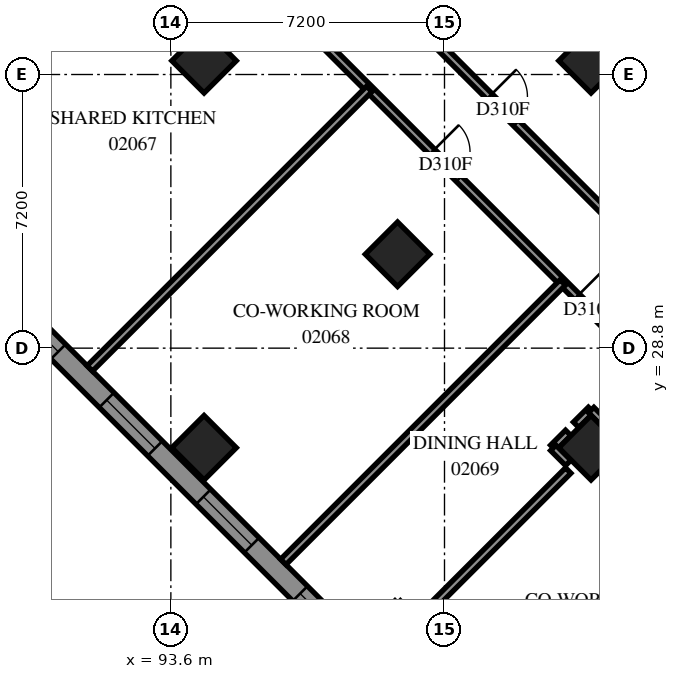
"""IFC4 building model, lengths in metres.
Left out: names, types, materials, properties, quantities, classifications, styles, units other than length and angle.
Written with IfcOpenShell. Run it as: python <this file> out.ifc"""

import sys

from ifc_helpers import new_model, si_unit, direction, frame, frame_2d, origin, origin_2d, place, context, subcontext, project, spatial, polyline, rectangle, outline, extrude, element, fill, save


model = new_model("IFC4")
c1 = context("Model", 3, precision=1e-05, world=origin(), true_north=direction((0.0, 1.0)))
c2 = subcontext(c1, "Body", "Model", "MODEL_VIEW")
j1 = project(units=[si_unit("LENGTHUNIT", "METRE"), si_unit("PLANEANGLEUNIT", "RADIAN")], contexts=[c1])
p1 = place(None, origin())
s1 = spatial("IfcSite", under=j1, at=p1, CompositionType="ELEMENT")
p2 = place(p1, origin())
s2 = spatial("IfcBuilding", under=s1, at=p2, CompositionType="ELEMENT")
p3 = place(p2, frame((0.0, 0.0, 10.2)))
s3 = spatial("IfcBuildingStorey", under=s2, at=p3, CompositionType="ELEMENT", Elevation=10.2)
for number, where, z_axis, x_axis in (
    (1, (94.474, 36.362, 0.0), (0.0, 0.0, 1.0), (0.707, -0.707, 0.0)),
    (2, (104.656, 36.362, 0.0), (0.0, 0.0, 1.0), (0.707, -0.707, 0.0)),
    (3, (99.565, 31.271, 0.0), (0.0, 0.0, 1.0), (0.707, -0.707, 0.0)),
    (4, (94.474, 26.18, 0.0), (0.0, 0.0, 1.0), (0.707, -0.707, 0.0)),
    (5, (104.656, 26.18, 0.0), (0.0, 0.0, 1.0), (0.707, -0.707, 0.0)),
):
    element("IfcColumn", number, at=place(p3, frame(where, z_axis=z_axis, x_axis=x_axis)), inside=s3, PredefinedType="COLUMN", context=c2, shape_type="SweptSolid", body=[
        extrude(rectangle(XDim=1.2, YDim=1.2, at=origin_2d()), origin(), (0.0, 0.0, 1.0), 3.8),
    ])
p4 = place(p3, frame((104.656, 14.689, 0.0), z_axis=(0.0, 0.0, 1.0), x_axis=(0.7071094621, 0.7071041002, 0.0)))
e6 = element("IfcWall", 6, at=p4, inside=s3, PredefinedType="SOLIDWALL", context=c2, shape_type="SweptSolid", body=[
    extrude(outline(polyline([(-0.275, -0.275), (18.925, -0.275), (18.375, 0.275), (0.275, 0.275), (-0.275, -0.275)])), origin(), (0.0, 0.0, 1.0), 3.8),
])
p5 = place(p4, frame((1.825, 0.0, 0.7)))
e7 = element("IfcOpeningElement", 7, at=p5, cuts=e6, PredefinedType="OPENING", context=c2, shape_type="SweptSolid", body=[
    extrude(rectangle(XDim=1.8, YDim=2.6, at=frame_2d((0.9, 1.3))), frame((0.0, 0.285, 0.0), z_axis=(0.0, -1.0, 0.0), x_axis=(1.0, 0.0, 0.0)), (0.0, 0.0, 1.0), 0.57),
])
p6 = place(p4, frame((5.425, 0.0, 0.7)))
e8 = element("IfcOpeningElement", 8, at=p6, cuts=e6, PredefinedType="OPENING", context=c2, shape_type="SweptSolid", body=[
    extrude(rectangle(XDim=1.8, YDim=2.6, at=frame_2d((0.9, 1.3))), frame((0.0, 0.285, 0.0), z_axis=(0.0, -1.0, 0.0), x_axis=(1.0, 0.0, 0.0)), (0.0, 0.0, 1.0), 0.57),
])
p7 = place(p4, frame((8.725, 0.0, 0.7)))
e9 = element("IfcOpeningElement", 9, at=p7, cuts=e6, PredefinedType="OPENING", context=c2, shape_type="SweptSolid", body=[
    extrude(rectangle(XDim=1.8, YDim=2.6, at=frame_2d((0.9, 1.3))), frame((0.0, 0.285, 0.0), z_axis=(0.0, -1.0, 0.0), x_axis=(1.0, 0.0, 0.0)), (0.0, 0.0, 1.0), 0.57),
])
p8 = place(p4, frame((12.875, 0.0, 0.7)))
e10 = element("IfcOpeningElement", 10, at=p8, cuts=e6, PredefinedType="OPENING", context=c2, shape_type="SweptSolid", body=[
    extrude(rectangle(XDim=1.8, YDim=2.6, at=frame_2d((0.9, 1.3))), frame((0.0, 0.285, 0.0), z_axis=(0.0, -1.0, 0.0), x_axis=(1.0, 0.0, 0.0)), (0.0, 0.0, 1.0), 0.57),
])
p9 = place(p4, frame((16.05, 0.0, 0.7)))
e11 = element("IfcOpeningElement", 11, at=p9, cuts=e6, PredefinedType="OPENING", context=c2, shape_type="SweptSolid", body=[
    extrude(rectangle(XDim=1.8, YDim=2.6, at=frame_2d((0.9, 1.3))), frame((0.0, 0.285, 0.0), z_axis=(0.0, -1.0, 0.0), x_axis=(1.0, 0.0, 0.0)), (0.0, 0.0, 1.0), 0.57),
])
p10 = place(p3, frame((117.843, 34.665, 0.0), z_axis=(0.0, 0.0, 1.0), x_axis=(-0.7071067812, 0.7071067812, 0.0)))
e12 = element("IfcWall", 12, at=p10, inside=s3, PredefinedType="SOLIDWALL", context=c2, shape_type="SweptSolid", body=[
    extrude(outline(polyline([(-0.275, -0.275), (54.222, -0.275), (53.994, 0.275), (0.275, 0.275), (-0.275, -0.275)])), origin(), (0.0, 0.0, 1.0), 3.8),
])
p11 = place(p10, frame((0.8, 0.0, 0.7)))
e13 = element("IfcOpeningElement", 13, at=p11, cuts=e12, PredefinedType="OPENING", context=c2, shape_type="SweptSolid", body=[
    extrude(rectangle(XDim=1.8, YDim=2.6, at=frame_2d((0.9, 1.3))), frame((0.0, 0.285, 0.0), z_axis=(0.0, -1.0, 0.0), x_axis=(1.0, 0.0, 0.0)), (0.0, 0.0, 1.0), 0.57),
])
p12 = place(p10, frame((4.225, 0.0, 0.7)))
e14 = element("IfcOpeningElement", 14, at=p12, cuts=e12, PredefinedType="OPENING", context=c2, shape_type="SweptSolid", body=[
    extrude(rectangle(XDim=1.8, YDim=2.6, at=frame_2d((0.9, 1.3))), frame((0.0, 0.285, 0.0), z_axis=(0.0, -1.0, 0.0), x_axis=(1.0, 0.0, 0.0)), (0.0, 0.0, 1.0), 0.57),
])
p13 = place(p10, frame((7.825, 0.0, 0.7)))
e15 = element("IfcOpeningElement", 15, at=p13, cuts=e12, PredefinedType="OPENING", context=c2, shape_type="SweptSolid", body=[
    extrude(rectangle(XDim=1.8, YDim=2.6, at=frame_2d((0.9, 1.3))), frame((0.0, 0.285, 0.0), z_axis=(0.0, -1.0, 0.0), x_axis=(1.0, 0.0, 0.0)), (0.0, 0.0, 1.0), 0.57),
])
p14 = place(p10, frame((11.425, 0.0, 0.7)))
e16 = element("IfcOpeningElement", 16, at=p14, cuts=e12, PredefinedType="OPENING", context=c2, shape_type="SweptSolid", body=[
    extrude(rectangle(XDim=1.8, YDim=2.6, at=frame_2d((0.9, 1.3))), frame((0.0, 0.285, 0.0), z_axis=(0.0, -1.0, 0.0), x_axis=(1.0, 0.0, 0.0)), (0.0, 0.0, 1.0), 0.57),
])
p15 = place(p10, frame((15.025, 0.0, 0.7)))
e17 = element("IfcOpeningElement", 17, at=p15, cuts=e12, PredefinedType="OPENING", context=c2, shape_type="SweptSolid", body=[
    extrude(rectangle(XDim=1.8, YDim=2.6, at=frame_2d((0.9, 1.3))), frame((0.0, 0.285, 0.0), z_axis=(0.0, -1.0, 0.0), x_axis=(1.0, 0.0, 0.0)), (0.0, 0.0, 1.0), 0.57),
])
p16 = place(p10, frame((18.625, 0.0, 0.7)))
e18 = element("IfcOpeningElement", 18, at=p16, cuts=e12, PredefinedType="OPENING", context=c2, shape_type="SweptSolid", body=[
    extrude(rectangle(XDim=1.8, YDim=2.6, at=frame_2d((0.9, 1.3))), frame((0.0, 0.285, 0.0), z_axis=(0.0, -1.0, 0.0), x_axis=(1.0, 0.0, 0.0)), (0.0, 0.0, 1.0), 0.57),
])
p17 = place(p10, frame((22.225, 0.0, 0.7)))
e19 = element("IfcOpeningElement", 19, at=p17, cuts=e12, PredefinedType="OPENING", context=c2, shape_type="SweptSolid", body=[
    extrude(rectangle(XDim=1.8, YDim=2.6, at=frame_2d((0.9, 1.3))), frame((0.0, 0.285, 0.0), z_axis=(0.0, -1.0, 0.0), x_axis=(1.0, 0.0, 0.0)), (0.0, 0.0, 1.0), 0.57),
])
p18 = place(p10, frame((25.825, 0.0, 0.7)))
e20 = element("IfcOpeningElement", 20, at=p18, cuts=e12, PredefinedType="OPENING", context=c2, shape_type="SweptSolid", body=[
    extrude(rectangle(XDim=1.8, YDim=2.6, at=frame_2d((0.9, 1.3))), frame((0.0, 0.285, 0.0), z_axis=(0.0, -1.0, 0.0), x_axis=(1.0, 0.0, 0.0)), (0.0, 0.0, 1.0), 0.57),
])
p19 = place(p10, frame((29.425, 0.0, 0.7)))
e21 = element("IfcOpeningElement", 21, at=p19, cuts=e12, PredefinedType="OPENING", context=c2, shape_type="SweptSolid", body=[
    extrude(rectangle(XDim=1.8, YDim=2.6, at=frame_2d((0.9, 1.3))), frame((0.0, 0.285, 0.0), z_axis=(0.0, -1.0, 0.0), x_axis=(1.0, 0.0, 0.0)), (0.0, 0.0, 1.0), 0.57),
])
p20 = place(p10, frame((33.025, 0.0, 0.7)))
e22 = element("IfcOpeningElement", 22, at=p20, cuts=e12, PredefinedType="OPENING", context=c2, shape_type="SweptSolid", body=[
    extrude(rectangle(XDim=1.8, YDim=2.6, at=frame_2d((0.9, 1.3))), frame((0.0, 0.285, 0.0), z_axis=(0.0, -1.0, 0.0), x_axis=(1.0, 0.0, 0.0)), (0.0, 0.0, 1.0), 0.57),
])
p21 = place(p10, frame((36.625, 0.0, 0.7)))
e23 = element("IfcOpeningElement", 23, at=p21, cuts=e12, PredefinedType="OPENING", context=c2, shape_type="SweptSolid", body=[
    extrude(rectangle(XDim=1.8, YDim=2.6, at=frame_2d((0.9, 1.3))), frame((0.0, 0.285, 0.0), z_axis=(0.0, -1.0, 0.0), x_axis=(1.0, 0.0, 0.0)), (0.0, 0.0, 1.0), 0.57),
])
p22 = place(p10, frame((40.225, 0.0, 0.7)))
e24 = element("IfcOpeningElement", 24, at=p22, cuts=e12, PredefinedType="OPENING", context=c2, shape_type="SweptSolid", body=[
    extrude(rectangle(XDim=1.8, YDim=2.6, at=frame_2d((0.9, 1.3))), frame((0.0, 0.285, 0.0), z_axis=(0.0, -1.0, 0.0), x_axis=(1.0, 0.0, 0.0)), (0.0, 0.0, 1.0), 0.57),
])
p23 = place(p10, frame((43.825, 0.0, 0.7)))
e25 = element("IfcOpeningElement", 25, at=p23, cuts=e12, PredefinedType="OPENING", context=c2, shape_type="SweptSolid", body=[
    extrude(rectangle(XDim=1.8, YDim=2.6, at=frame_2d((0.9, 1.3))), frame((0.0, 0.285, 0.0), z_axis=(0.0, -1.0, 0.0), x_axis=(1.0, 0.0, 0.0)), (0.0, 0.0, 1.0), 0.57),
])
p24 = place(p10, frame((47.425, 0.0, 0.7)))
e26 = element("IfcOpeningElement", 26, at=p24, cuts=e12, PredefinedType="OPENING", context=c2, shape_type="SweptSolid", body=[
    extrude(rectangle(XDim=1.8, YDim=2.6, at=frame_2d((0.9, 1.3))), frame((0.0, 0.285, 0.0), z_axis=(0.0, -1.0, 0.0), x_axis=(1.0, 0.0, 0.0)), (0.0, 0.0, 1.0), 0.57),
])
p25 = place(p10, frame((50.96, 0.0, 0.7)))
e27 = element("IfcOpeningElement", 27, at=p25, cuts=e12, PredefinedType="OPENING", context=c2, shape_type="SweptSolid", body=[
    extrude(rectangle(XDim=1.8, YDim=2.6, at=frame_2d((0.9, 1.3))), frame((0.0, 0.285, 0.0), z_axis=(0.0, -1.0, 0.0), x_axis=(1.0, 0.0, 0.0)), (0.0, 0.0, 1.0), 0.57),
])
p26 = place(p3, frame((77.07, 42.275, 0.0), z_axis=(0.0, 0.0, 1.0), x_axis=(0.7071067812, -0.7071067812, 0.0)))
e28 = element("IfcWall", 28, at=p26, inside=s3, PredefinedType="SOLIDWALL", context=c2, shape_type="SweptSolid", body=[
    extrude(outline(polyline([(0.114, -0.275), (39.288, -0.275), (38.737, 0.275), (-0.114, 0.275), (0.114, -0.275)])), origin(), (0.0, 0.0, 1.0), 3.8),
])
p27 = place(p26, frame((2.837, 0.0, 0.7)))
e29 = element("IfcOpeningElement", 29, at=p27, cuts=e28, PredefinedType="OPENING", context=c2, shape_type="SweptSolid", body=[
    extrude(rectangle(XDim=1.8, YDim=2.6, at=frame_2d((0.9, 1.3))), frame((0.0, 0.285, 0.0), z_axis=(0.0, -1.0, 0.0), x_axis=(1.0, 0.0, 0.0)), (0.0, 0.0, 1.0), 0.57),
])
p28 = place(p26, frame((6.588, 0.0, 0.7)))
e30 = element("IfcOpeningElement", 30, at=p28, cuts=e28, PredefinedType="OPENING", context=c2, shape_type="SweptSolid", body=[
    extrude(rectangle(XDim=1.8, YDim=2.6, at=frame_2d((0.9, 1.3))), frame((0.0, 0.285, 0.0), z_axis=(0.0, -1.0, 0.0), x_axis=(1.0, 0.0, 0.0)), (0.0, 0.0, 1.0), 0.57),
])
p29 = place(p26, frame((10.188, 0.0, 0.7)))
e31 = element("IfcOpeningElement", 31, at=p29, cuts=e28, PredefinedType="OPENING", context=c2, shape_type="SweptSolid", body=[
    extrude(rectangle(XDim=1.8, YDim=2.6, at=frame_2d((0.9, 1.3))), frame((0.0, 0.285, 0.0), z_axis=(0.0, -1.0, 0.0), x_axis=(1.0, 0.0, 0.0)), (0.0, 0.0, 1.0), 0.57),
])
p30 = place(p26, frame((13.787, 0.0, 0.7)))
e32 = element("IfcOpeningElement", 32, at=p30, cuts=e28, PredefinedType="OPENING", context=c2, shape_type="SweptSolid", body=[
    extrude(rectangle(XDim=1.8, YDim=2.6, at=frame_2d((0.9, 1.3))), frame((0.0, 0.285, 0.0), z_axis=(0.0, -1.0, 0.0), x_axis=(1.0, 0.0, 0.0)), (0.0, 0.0, 1.0), 0.57),
])
p31 = place(p26, frame((17.387, 0.0, 0.7)))
e33 = element("IfcOpeningElement", 33, at=p31, cuts=e28, PredefinedType="OPENING", context=c2, shape_type="SweptSolid", body=[
    extrude(rectangle(XDim=1.8, YDim=2.6, at=frame_2d((0.9, 1.3))), frame((0.0, 0.285, 0.0), z_axis=(0.0, -1.0, 0.0), x_axis=(1.0, 0.0, 0.0)), (0.0, 0.0, 1.0), 0.57),
])
p32 = place(p26, frame((20.988, 0.0, 0.7)))
e34 = element("IfcOpeningElement", 34, at=p32, cuts=e28, PredefinedType="OPENING", context=c2, shape_type="SweptSolid", body=[
    extrude(rectangle(XDim=1.8, YDim=2.6, at=frame_2d((0.9, 1.3))), frame((0.0, 0.285, 0.0), z_axis=(0.0, -1.0, 0.0), x_axis=(1.0, 0.0, 0.0)), (0.0, 0.0, 1.0), 0.57),
])
p33 = place(p26, frame((24.587, 0.0, 0.7)))
e35 = element("IfcOpeningElement", 35, at=p33, cuts=e28, PredefinedType="OPENING", context=c2, shape_type="SweptSolid", body=[
    extrude(rectangle(XDim=1.8, YDim=2.6, at=frame_2d((0.9, 1.3))), frame((0.0, 0.285, 0.0), z_axis=(0.0, -1.0, 0.0), x_axis=(1.0, 0.0, 0.0)), (0.0, 0.0, 1.0), 0.57),
])
p34 = place(p26, frame((28.188, 0.0, 0.7)))
e36 = element("IfcOpeningElement", 36, at=p34, cuts=e28, PredefinedType="OPENING", context=c2, shape_type="SweptSolid", body=[
    extrude(rectangle(XDim=1.8, YDim=2.6, at=frame_2d((0.9, 1.3))), frame((0.0, 0.285, 0.0), z_axis=(0.0, -1.0, 0.0), x_axis=(1.0, 0.0, 0.0)), (0.0, 0.0, 1.0), 0.57),
])
p35 = place(p26, frame((31.788, 0.0, 0.7)))
e37 = element("IfcOpeningElement", 37, at=p35, cuts=e28, PredefinedType="OPENING", context=c2, shape_type="SweptSolid", body=[
    extrude(rectangle(XDim=1.8, YDim=2.6, at=frame_2d((0.9, 1.3))), frame((0.0, 0.285, 0.0), z_axis=(0.0, -1.0, 0.0), x_axis=(1.0, 0.0, 0.0)), (0.0, 0.0, 1.0), 0.57),
])
p36 = place(p26, frame((35.388, 0.0, 0.7)))
e38 = element("IfcOpeningElement", 38, at=p36, cuts=e28, PredefinedType="OPENING", context=c2, shape_type="SweptSolid", body=[
    extrude(rectangle(XDim=1.8, YDim=2.6, at=frame_2d((0.9, 1.3))), frame((0.0, 0.285, 0.0), z_axis=(0.0, -1.0, 0.0), x_axis=(1.0, 0.0, 0.0)), (0.0, 0.0, 1.0), 0.57),
])
p37 = place(p3, frame((94.861, 42.544, 0.0), z_axis=(0.0, 0.0, 1.0), x_axis=(0.7071067812, -0.7071067812, 0.0)))
e39 = element("IfcWall", 39, at=p37, inside=s3, PredefinedType="PARTITIONING", context=c2, shape_type="SweptSolid", body=[
    extrude(rectangle(XDim=25.699, YDim=0.2, at=frame_2d((12.85, 0.0))), origin(), (0.0, 0.0, 1.0), 3.8),
])
p38 = place(p37, frame((10.072, 0.0, 0.0)))
e40 = element("IfcOpeningElement", 40, at=p38, cuts=e39, PredefinedType="OPENING", context=c2, shape_type="SweptSolid", body=[
    extrude(rectangle(XDim=1.0, YDim=2.1, at=frame_2d((0.5, 1.05))), frame((0.0, 0.11, 0.0), z_axis=(0.0, -1.0, 0.0), x_axis=(1.0, 0.0, 0.0)), (0.0, 0.0, 1.0), 0.22),
])
p39 = place(p37, frame((2.872, 0.0, 0.0)))
e41 = element("IfcOpeningElement", 41, at=p39, cuts=e39, PredefinedType="OPENING", context=c2, shape_type="SweptSolid", body=[
    extrude(rectangle(XDim=1.0, YDim=2.1, at=frame_2d((0.5, 1.05))), frame((0.0, 0.11, 0.0), z_axis=(0.0, -1.0, 0.0), x_axis=(1.0, 0.0, 0.0)), (0.0, 0.0, 1.0), 0.22),
])
p40 = place(p37, frame((17.272, 0.0, 0.0)))
e42 = element("IfcOpeningElement", 42, at=p40, cuts=e39, PredefinedType="OPENING", context=c2, shape_type="SweptSolid", body=[
    extrude(rectangle(XDim=1.0, YDim=2.1, at=frame_2d((0.5, 1.05))), frame((0.0, 0.11, 0.0), z_axis=(0.0, -1.0, 0.0), x_axis=(1.0, 0.0, 0.0)), (0.0, 0.0, 1.0), 0.22),
])
p41 = place(p37, frame((22.606, 0.0, 0.0)))
e43 = element("IfcOpeningElement", 43, at=p41, cuts=e39, PredefinedType="OPENING", context=c2, shape_type="SweptSolid", body=[
    extrude(rectangle(XDim=1.0, YDim=2.1, at=frame_2d((0.5, 1.05))), frame((0.0, 0.11, 0.0), z_axis=(0.0, -1.0, 0.0), x_axis=(1.0, 0.0, 0.0)), (0.0, 0.0, 1.0), 0.22),
])
p42 = place(p3, frame((93.375, 41.061, 0.0), z_axis=(0.0, 0.0, 1.0), x_axis=(0.7071067812, -0.7071067812, 0.0)))
e44 = element("IfcWall", 44, at=p42, inside=s3, PredefinedType="PARTITIONING", context=c2, shape_type="SweptSolid", body=[
    extrude(rectangle(XDim=25.699, YDim=0.2, at=frame_2d((12.85, 0.0))), origin(), (0.0, 0.0, 1.0), 3.8),
])
p43 = place(p42, frame((2.837, 0.0, 0.0)))
e45 = element("IfcOpeningElement", 45, at=p43, cuts=e44, PredefinedType="OPENING", context=c2, shape_type="SweptSolid", body=[
    extrude(rectangle(XDim=1.0, YDim=2.1, at=frame_2d((0.5, 1.05))), frame((0.0, 0.11, 0.0), z_axis=(0.0, -1.0, 0.0), x_axis=(1.0, 0.0, 0.0)), (0.0, 0.0, 1.0), 0.22),
])
p44 = place(p42, frame((10.037, 0.0, 0.0)))
e46 = element("IfcOpeningElement", 46, at=p44, cuts=e44, PredefinedType="OPENING", context=c2, shape_type="SweptSolid", body=[
    extrude(rectangle(XDim=1.0, YDim=2.1, at=frame_2d((0.5, 1.05))), frame((0.0, 0.11, 0.0), z_axis=(0.0, -1.0, 0.0), x_axis=(1.0, 0.0, 0.0)), (0.0, 0.0, 1.0), 0.22),
])
p45 = place(p42, frame((15.425, 0.0, 0.0)))
e47 = element("IfcOpeningElement", 47, at=p45, cuts=e44, PredefinedType="OPENING", context=c2, shape_type="SweptSolid", body=[
    extrude(rectangle(XDim=1.0, YDim=2.1, at=frame_2d((0.5, 1.05))), frame((0.0, 0.11, 0.0), z_axis=(0.0, -1.0, 0.0), x_axis=(1.0, 0.0, 0.0)), (0.0, 0.0, 1.0), 0.22),
])
p46 = place(p42, frame((22.057, 0.0, 0.0)))
e48 = element("IfcOpeningElement", 48, at=p46, cuts=e44, PredefinedType="OPENING", context=c2, shape_type="SweptSolid", body=[
    extrude(rectangle(XDim=1.0, YDim=2.1, at=frame_2d((0.5, 1.05))), frame((0.0, 0.11, 0.0), z_axis=(0.0, -1.0, 0.0), x_axis=(1.0, 0.0, 0.0)), (0.0, 0.0, 1.0), 0.22),
])
for number, where, z_axis, x_axis in (
    (49, (86.376, 33.357, 0.0), (0.0, 0.0, 1.0), (0.707, 0.707, 0.0)),
    (50, (91.468, 28.266, 0.0), (0.0, 0.0, 1.0), (0.707, 0.707, 0.0)),
    (51, (96.559, 23.175, 0.0), (0.0, 0.0, 1.0), (0.707, 0.707, 0.0)),
):
    element("IfcWall", number, at=place(p3, frame(where, z_axis=z_axis, x_axis=x_axis)), inside=s3, PredefinedType="PARTITIONING", context=c2, shape_type="SweptSolid", body=[
        extrude(rectangle(XDim=10.4, YDim=0.2, at=frame_2d((5.2, 0.0))), origin(), (0.0, 0.0, 1.0), 3.8),
    ])
p47 = place(p3, frame((86.836, 34.524, 0.0), z_axis=(0.0, 0.0, 1.0), x_axis=(0.7071067812, 0.7071067812, 0.0)))
e52 = element("IfcWall", 52, at=p47, inside=s3, PredefinedType="PARTITIONING", context=c2, shape_type="SweptSolid", body=[
    extrude(rectangle(XDim=9.249, YDim=0.2, at=frame_2d((4.625, 0.0))), origin(), (0.0, 0.0, 1.0), 3.8),
])
p48 = place(p3, frame((100.163, 21.689, 0.0), z_axis=(0.0, 0.0, 1.0), x_axis=(0.7071067812, 0.7071067812, 0.0)))
e53 = element("IfcWall", 53, at=p48, inside=s3, PredefinedType="PARTITIONING", context=c2, shape_type="SweptSolid", body=[
    extrude(rectangle(XDim=5.504, YDim=0.2, at=frame_2d((2.752, 0.0))), origin(), (0.0, 0.0, 1.0), 3.8),
])
for number, where, z_axis, x_axis in (
    (54, (103.661, 26.177, 0.0), (0.0, 0.0, 1.0), (0.707, 0.707, 0.0)),
    (55, (103.662, 26.177, 0.0), (0.0, 0.0, 1.0), (0.707, -0.707, 0.0)),
):
    element("IfcWall", number, at=place(p3, frame(where, z_axis=z_axis, x_axis=x_axis)), inside=s3, PredefinedType="PARTITIONING", context=c2, shape_type="SweptSolid", body=[
        extrude(rectangle(XDim=0.557, YDim=0.2, at=frame_2d((0.279, 0.0))), origin(), (0.0, 0.0, 1.0), 3.8),
    ])
p49 = place(p3, frame((104.263, 26.784, 0.0), z_axis=(0.0, 0.0, 1.0), x_axis=(0.7089037401, 0.705305244, 0.0)))
e56 = element("IfcWall", 56, at=p49, inside=s3, PredefinedType="PARTITIONING", context=c2, shape_type="SweptSolid", body=[
    extrude(rectangle(XDim=0.556, YDim=0.2, at=frame_2d((0.278, 0.0))), origin(), (0.0, 0.0, 1.0), 3.8),
])
p50 = place(p3, frame((104.66, 27.172, 0.0), z_axis=(0.0, 0.0, 1.0), x_axis=(0.7071067812, -0.7071067812, 0.0)))
e57 = element("IfcWall", 57, at=p50, inside=s3, PredefinedType="PARTITIONING", context=c2, shape_type="SweptSolid", body=[
    extrude(rectangle(XDim=0.554, YDim=0.2, at=frame_2d((0.277, 0.0))), origin(), (0.0, 0.0, 1.0), 3.8),
])
p51 = place(p31, origin())
e58 = element("IfcWindow", 58, at=p51, inside=s3, PartitioningType="SINGLE_PANEL", PredefinedType="WINDOW", context=c2, shape_type="SweptSolid", body=[
    extrude(rectangle(XDim=1.8, YDim=2.6, at=frame_2d((0.9, 1.3))), frame((0.0, 0.155, 0.0), z_axis=(0.0, -1.0, 0.0), x_axis=(1.0, 0.0, 0.0)), (0.0, 0.0, 1.0), 0.06),
])
fill(e33, e58)
p52 = place(p32, origin())
e59 = element("IfcWindow", 59, at=p52, inside=s3, PartitioningType="SINGLE_PANEL", PredefinedType="WINDOW", context=c2, shape_type="SweptSolid", body=[
    extrude(rectangle(XDim=1.8, YDim=2.6, at=frame_2d((0.9, 1.3))), frame((0.0, 0.155, 0.0), z_axis=(0.0, -1.0, 0.0), x_axis=(1.0, 0.0, 0.0)), (0.0, 0.0, 1.0), 0.06),
])
fill(e34, e59)
p53 = place(p33, origin())
e60 = element("IfcWindow", 60, at=p53, inside=s3, PartitioningType="SINGLE_PANEL", PredefinedType="WINDOW", context=c2, shape_type="SweptSolid", body=[
    extrude(rectangle(XDim=1.8, YDim=2.6, at=frame_2d((0.9, 1.3))), frame((0.0, 0.155, 0.0), z_axis=(0.0, -1.0, 0.0), x_axis=(1.0, 0.0, 0.0)), (0.0, 0.0, 1.0), 0.06),
])
fill(e35, e60)
p54 = place(p34, origin())
e61 = element("IfcWindow", 61, at=p54, inside=s3, PartitioningType="SINGLE_PANEL", PredefinedType="WINDOW", context=c2, shape_type="SweptSolid", body=[
    extrude(rectangle(XDim=1.8, YDim=2.6, at=frame_2d((0.9, 1.3))), frame((0.0, 0.155, 0.0), z_axis=(0.0, -1.0, 0.0), x_axis=(1.0, 0.0, 0.0)), (0.0, 0.0, 1.0), 0.06),
])
fill(e36, e61)
p55 = place(p38, origin())
e62 = element("IfcDoor", 62, at=p55, inside=s3, OperationType="SINGLE_SWING_RIGHT", PredefinedType="DOOR", context=c2, shape_type="SweptSolid", body=[
    extrude(rectangle(XDim=1.0, YDim=2.1, at=frame_2d((0.5, 1.05))), frame((0.0, 0.025, 0.0), z_axis=(0.0, -1.0, 0.0), x_axis=(1.0, 0.0, 0.0)), (0.0, 0.0, 1.0), 0.05),
])
fill(e40, e62)
p56 = place(p44, origin())
e63 = element("IfcDoor", 63, at=p56, inside=s3, OperationType="SINGLE_SWING_LEFT", PredefinedType="DOOR", context=c2, shape_type="SweptSolid", body=[
    extrude(rectangle(XDim=1.0, YDim=2.1, at=frame_2d((0.5, 1.05))), frame((0.0, 0.025, 0.0), z_axis=(0.0, -1.0, 0.0), x_axis=(1.0, 0.0, 0.0)), (0.0, 0.0, 1.0), 0.05),
])
fill(e46, e63)
p57 = place(p45, origin())
e64 = element("IfcDoor", 64, at=p57, inside=s3, OperationType="SINGLE_SWING_LEFT", PredefinedType="DOOR", context=c2, shape_type="SweptSolid", body=[
    extrude(rectangle(XDim=1.0, YDim=2.1, at=frame_2d((0.5, 1.05))), frame((0.0, 0.025, 0.0), z_axis=(0.0, -1.0, 0.0), x_axis=(1.0, 0.0, 0.0)), (0.0, 0.0, 1.0), 0.05),
])
fill(e47, e64)
save(model, sys.argv[1])
